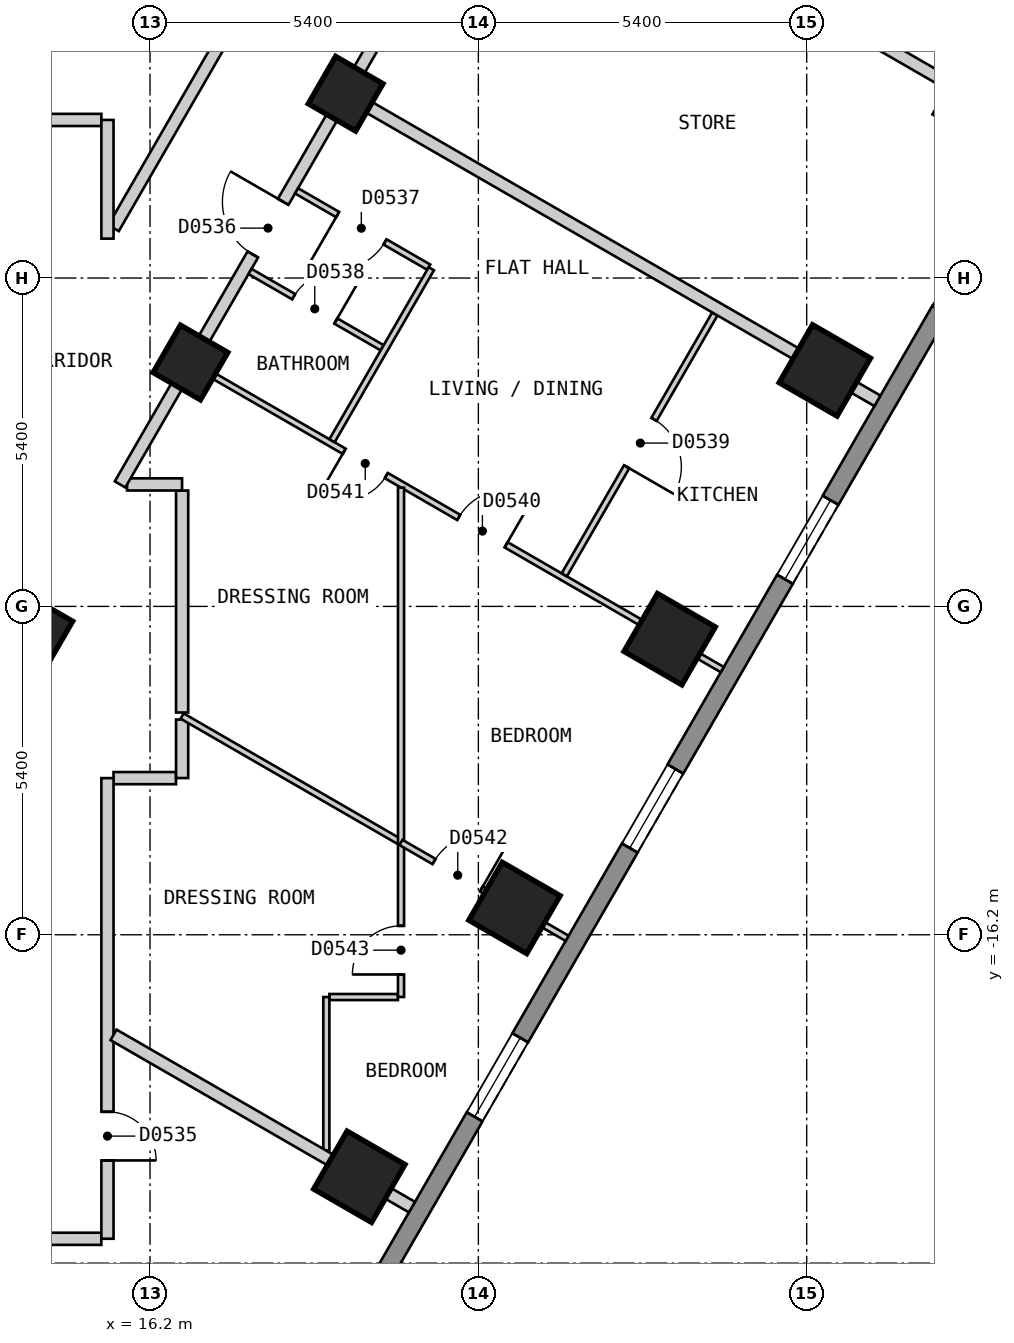
"""IFC4 building model, lengths in metres.
Left out: names, types, materials, properties, quantities, classifications, styles, units other than length and angle.
Written with IfcOpenShell. Run it as: python <this file> out.ifc"""

import sys

from ifc_helpers import new_model, si_unit, direction, frame, frame_2d, origin, origin_2d, place, context, subcontext, project, spatial, polyline, rectangle, outline, extrude, element, fill, save


model = new_model("IFC4")
c1 = context("Model", 3, precision=1e-05, world=origin(), true_north=direction((0.0, 1.0)))
c2 = subcontext(c1, "Body", "Model", "MODEL_VIEW")
j1 = project(units=[si_unit("LENGTHUNIT", "METRE"), si_unit("PLANEANGLEUNIT", "RADIAN")], contexts=[c1])
p1 = place(None, origin())
s1 = spatial("IfcSite", under=j1, at=p1, CompositionType="ELEMENT")
p2 = place(p1, origin())
s2 = spatial("IfcBuilding", under=s1, at=p2, CompositionType="ELEMENT")
p3 = place(p2, frame((0.0, 0.0, 50.4)))
s3 = spatial("IfcBuildingStorey", under=s2, at=p3, CompositionType="ELEMENT", Elevation=50.4)
for number, where, z_axis, x_axis in (
    (1, (19.642, -20.18, 0.0), (0.0, 0.0, 1.0), (0.5, 0.866, 0.0)),
    (2, (22.194, -15.759, 0.0), (0.0, 0.0, 1.0), (0.5, 0.866, 0.0)),
    (3, (24.746, -11.339, 0.0), (0.0, 0.0, 1.0), (0.5, 0.866, 0.0)),
    (4, (27.298, -6.919, 0.0), (0.0, 0.0, 1.0), (0.5, 0.866, 0.0)),
    (5, (29.849, -2.499, 0.0), (0.0, 0.0, 1.0), (0.5, 0.866, 0.0)),
):
    element("IfcColumn", number, at=place(p3, frame(where, z_axis=z_axis, x_axis=x_axis)), inside=s3, PredefinedType="COLUMN", context=c2, shape_type="SweptSolid", body=[
        extrude(rectangle(XDim=1.1, YDim=1.1, at=origin_2d()), origin(), (0.0, 0.0, 1.0), 3.0),
    ])
for number, where, z_axis, x_axis in (
    (6, (14.313, -11.209, 0.0), (0.0, 0.0, 1.0), (0.5, 0.866, 0.0)),
    (7, (16.865, -6.789, 0.0), (0.0, 0.0, 1.0), (0.5, 0.866, 0.0)),
    (8, (19.417, -2.369, 0.0), (0.0, 0.0, 1.0), (0.5, 0.866, 0.0)),
):
    element("IfcColumn", number, at=place(p3, frame(where, z_axis=z_axis, x_axis=x_axis)), inside=s3, PredefinedType="COLUMN", context=c2, shape_type="SweptSolid", body=[
        extrude(rectangle(XDim=0.9, YDim=0.9, at=origin_2d()), origin(), (0.0, 0.0, 1.0), 3.0),
    ])
p4 = place(p3, frame((17.71, -25.825, 0.0), z_axis=(0.0, 0.0, 1.0), x_axis=(0.500001938803, 0.866024284413, 0.0)))
e9 = element("IfcWall", 9, at=p4, inside=s3, PredefinedType="SOLIDWALL", context=c2, shape_type="SweptSolid", body=[
    extrude(outline(polyline([(0.0, -0.15), (27.02, -0.15), (26.94, 0.15), (0.08, 0.15), (0.0, -0.15)])), origin(), (0.0, 0.0, 1.0), 2.7),
])
p5 = place(p4, frame((2.553, 0.0, 0.15)))
e10 = element("IfcOpeningElement", 10, at=p5, cuts=e9, PredefinedType="OPENING", context=c2, shape_type="SweptSolid", body=[
    extrude(rectangle(XDim=1.5, YDim=2.1, at=frame_2d((0.75, 1.05))), frame((0.0, 0.16, 0.0), z_axis=(0.0, -1.0, 0.0), x_axis=(1.0, 0.0, 0.0)), (0.0, 0.0, 1.0), 0.32),
])
p6 = place(p4, frame((7.658, 0.0, 0.15)))
e11 = element("IfcOpeningElement", 11, at=p6, cuts=e9, PredefinedType="OPENING", context=c2, shape_type="SweptSolid", body=[
    extrude(rectangle(XDim=1.5, YDim=2.1, at=frame_2d((0.75, 1.05))), frame((0.0, 0.16, 0.0), z_axis=(0.0, -1.0, 0.0), x_axis=(1.0, 0.0, 0.0)), (0.0, 0.0, 1.0), 0.32),
])
p7 = place(p4, frame((12.761, 0.0, 0.15)))
e12 = element("IfcOpeningElement", 12, at=p7, cuts=e9, PredefinedType="OPENING", context=c2, shape_type="SweptSolid", body=[
    extrude(rectangle(XDim=1.5, YDim=2.1, at=frame_2d((0.75, 1.05))), frame((0.0, 0.16, 0.0), z_axis=(0.0, -1.0, 0.0), x_axis=(1.0, 0.0, 0.0)), (0.0, 0.0, 1.0), 0.32),
])
p8 = place(p4, frame((17.865, 0.0, 0.15)))
e13 = element("IfcOpeningElement", 13, at=p8, cuts=e9, PredefinedType="OPENING", context=c2, shape_type="SweptSolid", body=[
    extrude(rectangle(XDim=1.5, YDim=2.1, at=frame_2d((0.75, 1.05))), frame((0.0, 0.16, 0.0), z_axis=(0.0, -1.0, 0.0), x_axis=(1.0, 0.0, 0.0)), (0.0, 0.0, 1.0), 0.32),
])
p9 = place(p4, frame((22.969, 0.0, 0.15)))
e14 = element("IfcOpeningElement", 14, at=p9, cuts=e9, PredefinedType="OPENING", context=c2, shape_type="SweptSolid", body=[
    extrude(rectangle(XDim=1.5, YDim=2.1, at=frame_2d((0.75, 1.05))), frame((0.0, 0.16, 0.0), z_axis=(0.0, -1.0, 0.0), x_axis=(1.0, 0.0, 0.0)), (0.0, 0.0, 1.0), 0.32),
])
p10 = place(p3, frame((16.728, -8.895, 0.0), z_axis=(0.0, 0.0, 1.0), x_axis=(0.0, -1.0, 0.0)))
e15 = element("IfcWall", 15, at=p10, inside=s3, PredefinedType="PARTITIONING", context=c2, shape_type="SweptSolid", body=[
    extrude(rectangle(XDim=3.65, YDim=0.2, at=frame_2d((1.825, 0.0))), origin(), (0.0, 0.0, 1.0), 2.7),
])
p11 = place(p3, frame((15.822, -8.794, 0.0), z_axis=(0.0, 0.0, 1.0), x_axis=(1.0, 0.0, 0.0)))
e16 = element("IfcWall", 16, at=p11, inside=s3, PredefinedType="PARTITIONING", context=c2, shape_type="SweptSolid", body=[
    extrude(rectangle(XDim=0.905, YDim=0.2, at=frame_2d((0.453, 0.0))), origin(), (0.0, 0.0, 1.0), 2.7),
])
p12 = place(p3, frame((15.6, -13.624, 0.0), z_axis=(0.0, 0.0, 1.0), x_axis=(1.0, 0.0, 0.0)))
e17 = element("IfcWall", 17, at=p12, inside=s3, PredefinedType="PARTITIONING", context=c2, shape_type="SweptSolid", body=[
    extrude(rectangle(XDim=1.027, YDim=0.2, at=frame_2d((0.513, 0.0))), origin(), (0.0, 0.0, 1.0), 2.7),
])
p13 = place(p3, frame((-15.4, -21.2, 0.0), z_axis=(0.0, 0.0, 1.0), x_axis=(1.0, 0.0, 0.0)))
e18 = element("IfcWall", 18, at=p13, inside=s3, PredefinedType="PARTITIONING", context=c2, shape_type="SweptSolid", body=[
    extrude(rectangle(XDim=30.799, YDim=0.2, at=frame_2d((15.399, 0.0))), origin(), (0.0, 0.0, 1.0), 2.7),
])
p14 = place(p13, frame((4.985, 0.0, 0.0)))
e19 = element("IfcOpeningElement", 19, at=p14, cuts=e18, PredefinedType="OPENING", context=c2, shape_type="SweptSolid", body=[
    extrude(rectangle(XDim=0.9, YDim=2.1, at=frame_2d((0.45, 1.05))), frame((0.0, 0.11, 0.0), z_axis=(0.0, -1.0, 0.0), x_axis=(1.0, 0.0, 0.0)), (0.0, 0.0, 1.0), 0.22),
])
p15 = place(p13, frame((20.005, 0.0, 0.0)))
e20 = element("IfcOpeningElement", 20, at=p15, cuts=e18, PredefinedType="OPENING", context=c2, shape_type="SweptSolid", body=[
    extrude(rectangle(XDim=1.0, YDim=2.1, at=frame_2d((0.5, 1.05))), frame((0.0, 0.11, 0.0), z_axis=(0.0, -1.0, 0.0), x_axis=(1.0, 0.0, 0.0)), (0.0, 0.0, 1.0), 0.22),
])
p16 = place(p13, frame((24.916, 0.0, 0.0)))
e21 = element("IfcOpeningElement", 21, at=p16, cuts=e18, PredefinedType="OPENING", context=c2, shape_type="SweptSolid", body=[
    extrude(rectangle(XDim=0.9, YDim=2.1, at=frame_2d((0.45, 1.05))), frame((0.0, 0.11, 0.0), z_axis=(0.0, -1.0, 0.0), x_axis=(1.0, 0.0, 0.0)), (0.0, 0.0, 1.0), 0.22),
])
p17 = place(p3, frame((7.028, -2.8, 0.0), z_axis=(0.0, 0.0, 1.0), x_axis=(1.0, 0.0, 0.0)))
e22 = element("IfcWall", 22, at=p17, inside=s3, PredefinedType="PARTITIONING", context=c2, shape_type="SweptSolid", body=[
    extrude(rectangle(XDim=8.372, YDim=0.2, at=frame_2d((4.186, 0.0))), origin(), (0.0, 0.0, 1.0), 2.7),
])
p18 = place(p3, frame((15.6, -4.579, 0.0), z_axis=(0.0, 0.0, 1.0), x_axis=(0.499927597274, 0.866067201483, 0.0)))
e23 = element("IfcWall", 23, at=p18, inside=s3, PredefinedType="PARTITIONING", context=c2, shape_type="SweptSolid", body=[
    extrude(rectangle(XDim=5.288, YDim=0.2, at=frame_2d((2.644, 0.0))), origin(), (0.0, 0.0, 1.0), 2.7),
])
p19 = place(p3, frame((15.707, -8.794, 0.0), z_axis=(0.0, 0.0, 1.0), x_axis=(0.50000451406, 0.866022797575, 0.0)))
e24 = element("IfcWall", 24, at=p19, inside=s3, PredefinedType="PARTITIONING", context=c2, shape_type="SweptSolid", body=[
    extrude(rectangle(XDim=10.04, YDim=0.2, at=frame_2d((5.02, 0.0))), origin(), (0.0, 0.0, 1.0), 2.7),
])
p20 = place(p19, frame((4.367, 0.0, 0.0)))
e25 = element("IfcOpeningElement", 25, at=p20, cuts=e24, PredefinedType="OPENING", context=c2, shape_type="SweptSolid", body=[
    extrude(rectangle(XDim=1.0, YDim=2.1, at=frame_2d((0.5, 1.05))), frame((0.0, 0.11, 0.0), z_axis=(0.0, -1.0, 0.0), x_axis=(1.0, 0.0, 0.0)), (0.0, 0.0, 1.0), 0.22),
])
p21 = place(p19, frame((8.402, 0.0, 0.0)))
e26 = element("IfcOpeningElement", 26, at=p21, cuts=e24, PredefinedType="OPENING", context=c2, shape_type="SweptSolid", body=[
    extrude(rectangle(XDim=0.8, YDim=2.1, at=frame_2d((0.4, 1.05))), frame((0.0, 0.11, 0.0), z_axis=(0.0, -1.0, 0.0), x_axis=(1.0, 0.0, 0.0)), (0.0, 0.0, 1.0), 0.22),
])
p22 = place(p3, frame((15.5, -21.199, 0.0), z_axis=(0.0, 0.0, 1.0), x_axis=(0.0, 1.0, 0.0)))
e27 = element("IfcWall", 27, at=p22, inside=s3, PredefinedType="PARTITIONING", context=c2, shape_type="SweptSolid", body=[
    extrude(rectangle(XDim=7.575, YDim=0.2, at=frame_2d((3.788, 0.0))), origin(), (0.0, 0.0, 1.0), 2.7),
])
p23 = place(p22, frame((1.288, 0.0, 0.0)))
e28 = element("IfcOpeningElement", 28, at=p23, cuts=e27, PredefinedType="OPENING", context=c2, shape_type="SweptSolid", body=[
    extrude(rectangle(XDim=0.8, YDim=2.1, at=frame_2d((0.4, 1.05))), frame((0.0, 0.11, 0.0), z_axis=(0.0, -1.0, 0.0), x_axis=(1.0, 0.0, 0.0)), (0.0, 0.0, 1.0), 0.22),
])
p24 = place(p3, frame((15.5, -4.752, 0.0), z_axis=(0.0, 0.0, 1.0), x_axis=(0.0, 1.0, 0.0)))
e29 = element("IfcWall", 29, at=p24, inside=s3, PredefinedType="PARTITIONING", context=c2, shape_type="SweptSolid", body=[
    extrude(rectangle(XDim=1.952, YDim=0.2, at=frame_2d((0.976, 0.0))), origin(), (0.0, 0.0, 1.0), 2.7),
])
p25 = place(p3, frame((16.728, -13.623, 0.0), z_axis=(0.0, 0.0, 1.0), x_axis=(0.0, 1.0, 0.0)))
e30 = element("IfcWall", 30, at=p25, inside=s3, PredefinedType="PARTITIONING", context=c2, shape_type="SweptSolid", body=[
    extrude(rectangle(XDim=0.962, YDim=0.2, at=frame_2d((0.481, 0.0))), origin(), (0.0, 0.0, 1.0), 2.7),
])
p26 = place(p3, frame((16.728, -12.603, 0.0), z_axis=(0.0, 0.0, 1.0), x_axis=(0.865975293465, -0.500086783578, 0.0)))
e31 = element("IfcWall", 31, at=p26, inside=s3, PredefinedType="PARTITIONING", context=c2, shape_type="SweptSolid", body=[
    extrude(rectangle(XDim=4.157, YDim=0.1, at=frame_2d((2.079, 0.0))), origin(), (0.0, 0.0, 1.0), 2.7),
])
p27 = place(p3, frame((17.844, -5.292, 0.0), z_axis=(0.0, 0.0, 1.0), x_axis=(0.866038211682, -0.499977815414, 0.0)))
e32 = element("IfcWall", 32, at=p27, inside=s3, PredefinedType="PARTITIONING", context=c2, shape_type="SweptSolid", body=[
    extrude(rectangle(XDim=2.51, YDim=0.1, at=frame_2d((1.255, 0.0))), origin(), (0.0, 0.0, 1.0), 2.7),
])
p28 = place(p27, frame((0.83, 0.0, 0.0)))
e33 = element("IfcOpeningElement", 33, at=p28, cuts=e32, PredefinedType="OPENING", context=c2, shape_type="SweptSolid", body=[
    extrude(rectangle(XDim=0.8, YDim=2.1, at=frame_2d((0.4, 1.05))), frame((0.0, 0.06, 0.0), z_axis=(0.0, -1.0, 0.0), x_axis=(1.0, 0.0, 0.0)), (0.0, 0.0, 1.0), 0.12),
])
p29 = place(p3, frame((18.61, -3.966, 0.0), z_axis=(0.0, 0.0, 1.0), x_axis=(0.865958718457, -0.500115484592, 0.0)))
e34 = element("IfcWall", 34, at=p29, inside=s3, PredefinedType="PARTITIONING", context=c2, shape_type="SweptSolid", body=[
    extrude(rectangle(XDim=2.509, YDim=0.1, at=frame_2d((1.255, 0.0))), origin(), (0.0, 0.0, 1.0), 2.7),
])
p30 = place(p29, frame((0.78, 0.0, 0.0)))
e35 = element("IfcOpeningElement", 35, at=p30, cuts=e34, PredefinedType="OPENING", context=c2, shape_type="SweptSolid", body=[
    extrude(rectangle(XDim=0.9, YDim=2.1, at=frame_2d((0.45, 1.05))), frame((0.0, 0.06, 0.0), z_axis=(0.0, -1.0, 0.0), x_axis=(1.0, 0.0, 0.0)), (0.0, 0.0, 1.0), 0.12),
])
p31 = place(p3, frame((16.951, -6.839, 0.0), z_axis=(0.0, 0.0, 1.0), x_axis=(0.866022959057, -0.500004234368, 0.0)))
e36 = element("IfcWall", 36, at=p31, inside=s3, PredefinedType="PARTITIONING", context=c2, shape_type="SweptSolid", body=[
    extrude(rectangle(XDim=10.0, YDim=0.1, at=frame_2d((5.0, 0.0))), origin(), (0.0, 0.0, 1.0), 2.7),
])
p32 = place(p31, frame((4.995, 0.0, 0.0)))
e37 = element("IfcOpeningElement", 37, at=p32, cuts=e36, PredefinedType="OPENING", context=c2, shape_type="SweptSolid", body=[
    extrude(rectangle(XDim=0.9, YDim=2.1, at=frame_2d((0.45, 1.05))), frame((0.0, 0.06, 0.0), z_axis=(0.0, -1.0, 0.0), x_axis=(1.0, 0.0, 0.0)), (0.0, 0.0, 1.0), 0.12),
])
p33 = place(p31, frame((2.82, 0.0, 0.0)))
e38 = element("IfcOpeningElement", 38, at=p33, cuts=e36, PredefinedType="OPENING", context=c2, shape_type="SweptSolid", body=[
    extrude(rectangle(XDim=0.8, YDim=2.1, at=frame_2d((0.4, 1.05))), frame((0.0, 0.06, 0.0), z_axis=(0.0, -1.0, 0.0), x_axis=(1.0, 0.0, 0.0)), (0.0, 0.0, 1.0), 0.12),
])
p34 = place(p3, frame((19.15, -17.224, 0.0), z_axis=(0.0, 0.0, 1.0), x_axis=(1.0, 0.0, 0.0)))
e39 = element("IfcWall", 39, at=p34, inside=s3, PredefinedType="PARTITIONING", context=c2, shape_type="SweptSolid", body=[
    extrude(rectangle(XDim=1.127, YDim=0.1, at=frame_2d((0.563, 0.0))), origin(), (0.0, 0.0, 1.0), 2.7),
])
p35 = place(p3, frame((19.193, -8.076, 0.0), z_axis=(0.0, 0.0, 1.0), x_axis=(0.499901468276, 0.866082283629, 0.0)))
e40 = element("IfcWall", 40, at=p35, inside=s3, PredefinedType="PARTITIONING", context=c2, shape_type="SweptSolid", body=[
    extrude(rectangle(XDim=3.266, YDim=0.1, at=frame_2d((1.633, 0.0))), origin(), (0.0, 0.0, 1.0), 2.7),
])
p36 = place(p3, frame((23.013, -10.281, 0.0), z_axis=(0.0, 0.0, 1.0), x_axis=(0.499881743012, 0.866093668724, 0.0)))
e41 = element("IfcWall", 41, at=p36, inside=s3, PredefinedType="PARTITIONING", context=c2, shape_type="SweptSolid", body=[
    extrude(rectangle(XDim=4.953, YDim=0.1, at=frame_2d((2.477, 0.0))), origin(), (0.0, 0.0, 1.0), 2.7),
])
p37 = place(p36, frame((2.052, 0.0, 0.0)))
e42 = element("IfcOpeningElement", 42, at=p37, cuts=e41, PredefinedType="OPENING", context=c2, shape_type="SweptSolid", body=[
    extrude(rectangle(XDim=0.9, YDim=2.1, at=frame_2d((0.45, 1.05))), frame((0.0, 0.06, 0.0), z_axis=(0.0, -1.0, 0.0), x_axis=(1.0, 0.0, 0.0)), (0.0, 0.0, 1.0), 0.12),
])
p38 = place(p3, frame((19.1, -19.751, 0.0), z_axis=(0.0, 0.0, 1.0), x_axis=(0.0, 1.0, 0.0)))
e43 = element("IfcWall", 43, at=p38, inside=s3, PredefinedType="PARTITIONING", context=c2, shape_type="SweptSolid", body=[
    extrude(rectangle(XDim=2.527, YDim=0.1, at=frame_2d((1.263, 0.0))), origin(), (0.0, 0.0, 1.0), 2.7),
])
p39 = place(p3, frame((20.328, -17.223, 0.0), z_axis=(0.0, 0.0, 1.0), x_axis=(0.0, 1.0, 0.0)))
e44 = element("IfcWall", 44, at=p39, inside=s3, PredefinedType="PARTITIONING", context=c2, shape_type="SweptSolid", body=[
    extrude(rectangle(XDim=8.376, YDim=0.1, at=frame_2d((4.188, 0.0))), origin(), (0.0, 0.0, 1.0), 2.7),
])
p40 = place(p39, frame((0.37, 0.0, 0.0)))
e45 = element("IfcOpeningElement", 45, at=p40, cuts=e44, PredefinedType="OPENING", context=c2, shape_type="SweptSolid", body=[
    extrude(rectangle(XDim=0.8, YDim=2.1, at=frame_2d((0.4, 1.05))), frame((0.0, 0.06, 0.0), z_axis=(0.0, -1.0, 0.0), x_axis=(1.0, 0.0, 0.0)), (0.0, 0.0, 1.0), 0.12),
])
p41 = place(p3, frame((12.297, -21.3, 0.0), z_axis=(0.0, 0.0, 1.0), x_axis=(0.500056399578, -0.865992839024, 0.0)))
e46 = element("IfcWall", 46, at=p41, inside=s3, PredefinedType="PARTITIONING", context=c2, shape_type="SweptSolid", body=[
    extrude(rectangle(XDim=6.455, YDim=0.2, at=frame_2d((3.228, 0.0))), origin(), (0.0, 0.0, 1.0), 2.7),
])
p42 = place(p3, frame((15.6, -17.846, 0.0), z_axis=(0.0, 0.0, 1.0), x_axis=(0.866071523686, -0.499920109479, 0.0)))
e47 = element("IfcWall", 47, at=p42, inside=s3, PredefinedType="PARTITIONING", context=c2, shape_type="SweptSolid", body=[
    extrude(rectangle(XDim=5.667, YDim=0.2, at=frame_2d((2.833, 0.0))), origin(), (0.0, 0.0, 1.0), 2.7),
])
p43 = place(p3, frame((19.503, -2.419, 0.0), z_axis=(0.0, 0.0, 1.0), x_axis=(0.866022959057, -0.500004234368, 0.0)))
e48 = element("IfcWall", 48, at=p43, inside=s3, PredefinedType="PARTITIONING", context=c2, shape_type="SweptSolid", body=[
    extrude(rectangle(XDim=10.0, YDim=0.2, at=frame_2d((5.0, 0.0))), origin(), (0.0, 0.0, 1.0), 2.7),
])
p44 = place(p3, frame((25.693, -0.099, 0.0), z_axis=(0.0, 0.0, 1.0), x_axis=(0.866032775405, -0.499987231761, 0.0)))
e49 = element("IfcWall", 49, at=p44, inside=s3, PredefinedType="PARTITIONING", context=c2, shape_type="SweptSolid", body=[
    extrude(rectangle(XDim=5.8, YDim=0.2, at=frame_2d((2.9, 0.0))), origin(), (0.0, 0.0, 1.0), 2.7),
])
p45 = place(p3, frame((20.328, -14.682, 0.0), z_axis=(0.0, 0.0, 1.0), x_axis=(0.866063163075, -0.499934593286, 0.0)))
e50 = element("IfcWall", 50, at=p45, inside=s3, PredefinedType="PARTITIONING", context=c2, shape_type="SweptSolid", body=[
    extrude(rectangle(XDim=3.155, YDim=0.1, at=frame_2d((1.577, 0.0))), origin(), (0.0, 0.0, 1.0), 2.7),
])
p46 = place(p45, frame((0.627, 0.0, 0.0)))
e51 = element("IfcOpeningElement", 51, at=p46, cuts=e50, PredefinedType="OPENING", context=c2, shape_type="SweptSolid", body=[
    extrude(rectangle(XDim=0.9, YDim=2.1, at=frame_2d((0.45, 1.05))), frame((0.0, 0.06, 0.0), z_axis=(0.0, -1.0, 0.0), x_axis=(1.0, 0.0, 0.0)), (0.0, 0.0, 1.0), 0.12),
])
p47 = place(p6, origin())
e52 = element("IfcWindow", 52, at=p47, inside=s3, PartitioningType="SINGLE_PANEL", PredefinedType="WINDOW", context=c2, shape_type="SweptSolid", body=[
    extrude(rectangle(XDim=1.5, YDim=2.1, at=frame_2d((0.75, 1.05))), frame((0.0, 0.03, 0.0), z_axis=(0.0, -1.0, 0.0), x_axis=(1.0, 0.0, 0.0)), (0.0, 0.0, 1.0), 0.06),
])
fill(e11, e52)
p48 = place(p7, origin())
e53 = element("IfcWindow", 53, at=p48, inside=s3, PartitioningType="SINGLE_PANEL", PredefinedType="WINDOW", context=c2, shape_type="SweptSolid", body=[
    extrude(rectangle(XDim=1.5, YDim=2.1, at=frame_2d((0.75, 1.05))), frame((0.0, 0.03, 0.0), z_axis=(0.0, -1.0, 0.0), x_axis=(1.0, 0.0, 0.0)), (0.0, 0.0, 1.0), 0.06),
])
fill(e12, e53)
p49 = place(p8, origin())
e54 = element("IfcWindow", 54, at=p49, inside=s3, PartitioningType="SINGLE_PANEL", PredefinedType="WINDOW", context=c2, shape_type="SweptSolid", body=[
    extrude(rectangle(XDim=1.5, YDim=2.1, at=frame_2d((0.75, 1.05))), frame((0.0, 0.03, 0.0), z_axis=(0.0, -1.0, 0.0), x_axis=(1.0, 0.0, 0.0)), (0.0, 0.0, 1.0), 0.06),
])
fill(e13, e54)
p50 = place(p23, origin())
e55 = element("IfcDoor", 55, at=p50, inside=s3, OperationType="SINGLE_SWING_LEFT", PredefinedType="DOOR", context=c2, shape_type="SweptSolid", body=[
    extrude(rectangle(XDim=0.8, YDim=2.1, at=frame_2d((0.4, 1.05))), frame((0.0, 0.025, 0.0), z_axis=(0.0, -1.0, 0.0), x_axis=(1.0, 0.0, 0.0)), (0.0, 0.0, 1.0), 0.05),
])
fill(e28, e55)
p51 = place(p20, origin())
e56 = element("IfcDoor", 56, at=p51, inside=s3, OperationType="SINGLE_SWING_RIGHT", PredefinedType="DOOR", context=c2, shape_type="SweptSolid", body=[
    extrude(rectangle(XDim=1.0, YDim=2.1, at=frame_2d((0.5, 1.05))), frame((0.0, 0.025, 0.0), z_axis=(0.0, -1.0, 0.0), x_axis=(1.0, 0.0, 0.0)), (0.0, 0.0, 1.0), 0.05),
])
fill(e25, e56)
p52 = place(p30, origin())
e57 = element("IfcDoor", 57, at=p52, inside=s3, OperationType="SINGLE_SWING_LEFT", PredefinedType="DOOR", context=c2, shape_type="SweptSolid", body=[
    extrude(rectangle(XDim=0.9, YDim=2.1, at=frame_2d((0.45, 1.05))), frame((0.0, 0.025, 0.0), z_axis=(0.0, -1.0, 0.0), x_axis=(1.0, 0.0, 0.0)), (0.0, 0.0, 1.0), 0.05),
])
fill(e35, e57)
p53 = place(p28, origin())
e58 = element("IfcDoor", 58, at=p53, inside=s3, OperationType="SINGLE_SWING_RIGHT", PredefinedType="DOOR", context=c2, shape_type="SweptSolid", body=[
    extrude(rectangle(XDim=0.8, YDim=2.1, at=frame_2d((0.4, 1.05))), frame((0.0, 0.025, 0.0), z_axis=(0.0, -1.0, 0.0), x_axis=(1.0, 0.0, 0.0)), (0.0, 0.0, 1.0), 0.05),
])
fill(e33, e58)
p54 = place(p37, origin())
e59 = element("IfcDoor", 59, at=p54, inside=s3, OperationType="SINGLE_SWING_LEFT", PredefinedType="DOOR", context=c2, shape_type="SweptSolid", body=[
    extrude(rectangle(XDim=0.9, YDim=2.1, at=frame_2d((0.45, 1.05))), frame((0.0, 0.025, 0.0), z_axis=(0.0, -1.0, 0.0), x_axis=(1.0, 0.0, 0.0)), (0.0, 0.0, 1.0), 0.05),
])
fill(e42, e59)
p55 = place(p32, origin())
e60 = element("IfcDoor", 60, at=p55, inside=s3, OperationType="SINGLE_SWING_RIGHT", PredefinedType="DOOR", context=c2, shape_type="SweptSolid", body=[
    extrude(rectangle(XDim=0.9, YDim=2.1, at=frame_2d((0.45, 1.05))), frame((0.0, 0.025, 0.0), z_axis=(0.0, -1.0, 0.0), x_axis=(1.0, 0.0, 0.0)), (0.0, 0.0, 1.0), 0.05),
])
fill(e37, e60)
p56 = place(p33, origin())
e61 = element("IfcDoor", 61, at=p56, inside=s3, OperationType="SINGLE_SWING_LEFT", PredefinedType="DOOR", context=c2, shape_type="SweptSolid", body=[
    extrude(rectangle(XDim=0.8, YDim=2.1, at=frame_2d((0.4, 1.05))), frame((0.0, 0.025, 0.0), z_axis=(0.0, -1.0, 0.0), x_axis=(1.0, 0.0, 0.0)), (0.0, 0.0, 1.0), 0.05),
])
fill(e38, e61)
p57 = place(p46, origin())
e62 = element("IfcDoor", 62, at=p57, inside=s3, OperationType="SINGLE_SWING_RIGHT", PredefinedType="DOOR", context=c2, shape_type="SweptSolid", body=[
    extrude(rectangle(XDim=0.9, YDim=2.1, at=frame_2d((0.45, 1.05))), frame((0.0, 0.025, 0.0), z_axis=(0.0, -1.0, 0.0), x_axis=(1.0, 0.0, 0.0)), (0.0, 0.0, 1.0), 0.05),
])
fill(e51, e62)
p58 = place(p40, origin())
e63 = element("IfcDoor", 63, at=p58, inside=s3, OperationType="SINGLE_SWING_LEFT", PredefinedType="DOOR", context=c2, shape_type="SweptSolid", body=[
    extrude(rectangle(XDim=0.8, YDim=2.1, at=frame_2d((0.4, 1.05))), frame((0.0, 0.025, 0.0), z_axis=(0.0, -1.0, 0.0), x_axis=(1.0, 0.0, 0.0)), (0.0, 0.0, 1.0), 0.05),
])
fill(e45, e63)
save(model, sys.argv[1])
